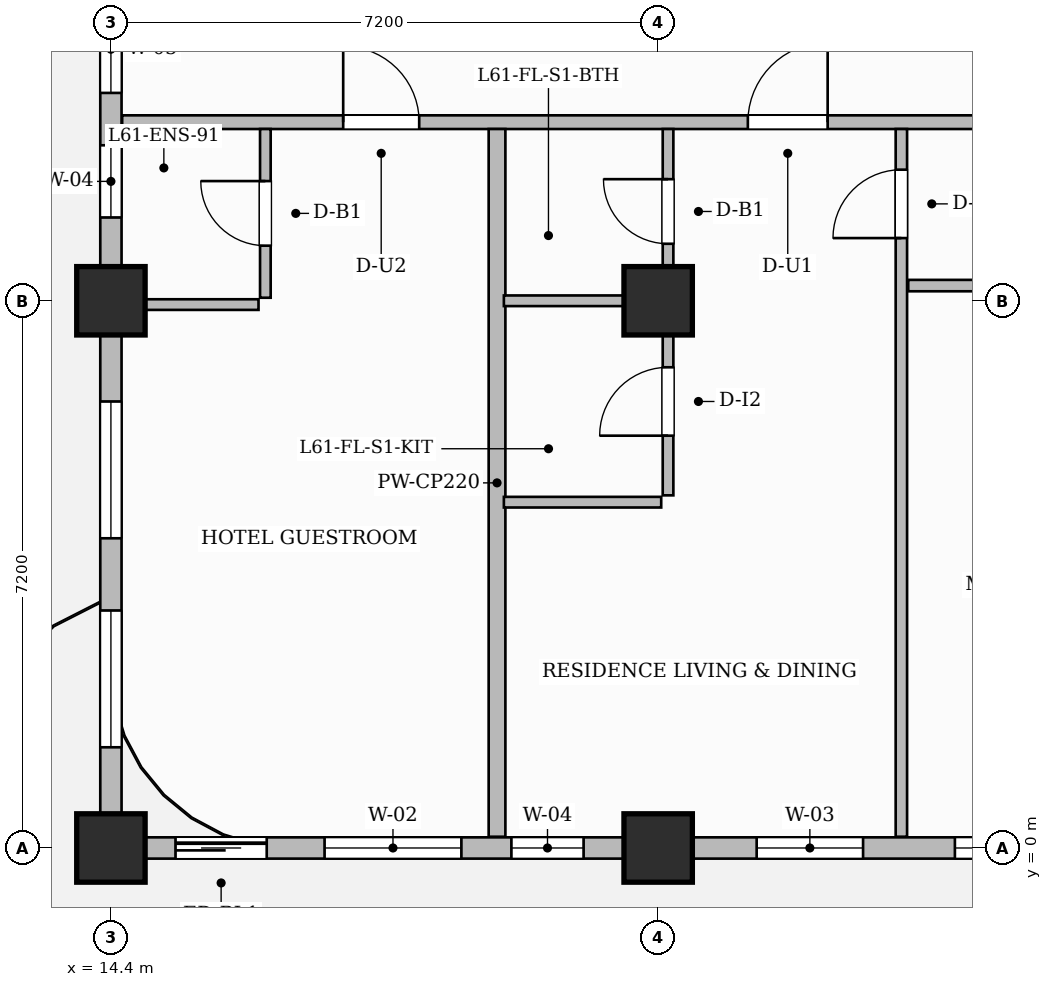
"""IFC4 building model, lengths in metres.
Left out: names, types, materials, properties, quantities, classifications, styles, units other than length and angle.
Written with IfcOpenShell. Run it as: python <this file> out.ifc"""

import sys

from ifc_helpers import new_model, si_unit, direction, frame, frame_2d, origin, origin_2d, place, context, subcontext, project, spatial, rectangle, extrude, source, transform, mapped, element, fill, save


model = new_model("IFC4")
c1 = context("Model", 3, precision=1e-05, world=origin(), true_north=direction((0.0, 1.0)))
c2 = subcontext(c1, "Body", "Model", "MODEL_VIEW")
j1 = project(units=[si_unit("LENGTHUNIT", "METRE"), si_unit("PLANEANGLEUNIT", "RADIAN")], contexts=[c1])
p1 = place(None, origin())
s1 = spatial("IfcSite", under=j1, at=p1, CompositionType="ELEMENT")
p2 = place(p1, origin())
s2 = spatial("IfcBuilding", under=s1, at=p2, CompositionType="ELEMENT")
p3 = place(p2, frame((0.0, 0.0, 244.25)))
s3 = spatial("IfcBuildingStorey", under=s2, at=p3, CompositionType="ELEMENT", Elevation=244.25)
m1 = source(origin(), c2, "Body", "SweptSolid", [
    extrude(rectangle(XDim=0.9, YDim=0.9, at=origin_2d()), origin(), (0.0, 0.0, 1.0), 3.85),
])
for number, where, z_axis, x_axis in (
    (1, (14.4, 0.0, 0.0), (0.0, 0.0, 1.0), (1.0, 0.0, 0.0)),
    (2, (14.4, 7.2, 0.0), (0.0, 0.0, 1.0), (1.0, 0.0, 0.0)),
    (3, (21.6, 0.0, 0.0), (0.0, 0.0, 1.0), (1.0, 0.0, 0.0)),
    (4, (21.6, 7.2, 0.0), (0.0, 0.0, 1.0), (1.0, 0.0, 0.0)),
):
    element("IfcColumn", number, at=place(p3, frame(where, z_axis=z_axis, x_axis=x_axis)), inside=s3, PredefinedType="COLUMN", context=c2, shape_type="MappedRepresentation", body=[
        mapped(m1, transform((0.0, 0.0, 0.0), scale=1.0)),
    ])
p4 = place(p3, frame((14.548, 9.55, 0.0), z_axis=(0.0, 0.0, 1.0), x_axis=(1.0, 0.0, 0.0)))
e5 = element("IfcWall", 5, at=p4, inside=s3, PredefinedType="PARTITIONING", context=c2, shape_type="SweptSolid", body=[
    extrude(rectangle(XDim=15.562, YDim=0.18, at=frame_2d((7.781, 0.0))), origin(), (0.0, 0.0, 1.0), 3.6),
])
p5 = place(p4, frame((2.908, 0.0, 0.0)))
e6 = element("IfcOpeningElement", 6, at=p5, cuts=e5, PredefinedType="OPENING", context=c2, shape_type="SweptSolid", body=[
    extrude(rectangle(XDim=1.0, YDim=2.2, at=frame_2d((0.5, 1.1))), frame((0.0, 0.1, 0.0), z_axis=(0.0, -1.0, 0.0), x_axis=(1.0, 0.0, 0.0)), (0.0, 0.0, 1.0), 0.2),
])
p6 = place(p4, frame((8.232, 0.0, 0.0)))
e7 = element("IfcOpeningElement", 7, at=p6, cuts=e5, PredefinedType="OPENING", context=c2, shape_type="SweptSolid", body=[
    extrude(rectangle(XDim=1.05, YDim=2.25, at=frame_2d((0.525, 1.125))), frame((0.0, 0.1, 0.0), z_axis=(0.0, -1.0, 0.0), x_axis=(1.0, 0.0, 0.0)), (0.0, 0.0, 1.0), 0.2),
])
p7 = place(p3, frame((19.48, 0.148, 0.0), z_axis=(0.0, 0.0, 1.0), x_axis=(0.0, 1.0, 0.0)))
e8 = element("IfcWall", 8, at=p7, inside=s3, PredefinedType="PARTITIONING", context=c2, shape_type="SweptSolid", body=[
    extrude(rectangle(XDim=9.312, YDim=0.22, at=frame_2d((4.656, 0.0))), origin(), (0.0, 0.0, 1.0), 3.6),
])
p8 = place(p3, frame((16.432, 7.24, 0.0), z_axis=(0.0, 0.0, 1.0), x_axis=(0.0, 1.0, 0.0)))
e9 = element("IfcWall", 9, at=p8, inside=s3, PredefinedType="PARTITIONING", context=c2, shape_type="SweptSolid", body=[
    extrude(rectangle(XDim=2.22, YDim=0.14, at=frame_2d((1.11, 0.0))), origin(), (0.0, 0.0, 1.0), 3.6),
])
p9 = place(p8, frame((0.685, 0.0, 0.0)))
e10 = element("IfcOpeningElement", 10, at=p9, cuts=e9, PredefinedType="OPENING", context=c2, shape_type="SweptSolid", body=[
    extrude(rectangle(XDim=0.85, YDim=2.1, at=frame_2d((0.425, 1.05))), frame((0.0, 0.08, 0.0), z_axis=(0.0, -1.0, 0.0), x_axis=(1.0, 0.0, 0.0)), (0.0, 0.0, 1.0), 0.16),
])
p10 = place(p3, frame((14.49, 7.15, 0.0), z_axis=(0.0, 0.0, 1.0), x_axis=(1.0, 0.0, 0.0)))
e11 = element("IfcWall", 11, at=p10, inside=s3, PredefinedType="PARTITIONING", context=c2, shape_type="SweptSolid", body=[
    extrude(rectangle(XDim=1.852, YDim=0.14, at=frame_2d((0.926, 0.0))), origin(), (0.0, 0.0, 1.0), 3.135),
])
p11 = place(p3, frame((21.73, 4.64, 0.0), z_axis=(0.0, 0.0, 1.0), x_axis=(0.0, 1.0, 0.0)))
e12 = element("IfcWall", 12, at=p11, inside=s3, PredefinedType="PARTITIONING", context=c2, shape_type="SweptSolid", body=[
    extrude(rectangle(XDim=4.82, YDim=0.14, at=frame_2d((2.41, 0.0))), origin(), (0.0, 0.0, 1.0), 3.135),
])
p12 = place(p11, frame((0.785, 0.0, 0.0)))
e13 = element("IfcOpeningElement", 13, at=p12, cuts=e12, PredefinedType="OPENING", context=c2, shape_type="SweptSolid", body=[
    extrude(rectangle(XDim=0.9, YDim=2.15, at=frame_2d((0.45, 1.075))), frame((0.0, 0.08, 0.0), z_axis=(0.0, -1.0, 0.0), x_axis=(1.0, 0.0, 0.0)), (0.0, 0.0, 1.0), 0.16),
])
p13 = place(p11, frame((3.31, 0.0, 0.0)))
e14 = element("IfcOpeningElement", 14, at=p13, cuts=e12, PredefinedType="OPENING", context=c2, shape_type="SweptSolid", body=[
    extrude(rectangle(XDim=0.85, YDim=2.1, at=frame_2d((0.425, 1.05))), frame((0.0, 0.08, 0.0), z_axis=(0.0, -1.0, 0.0), x_axis=(1.0, 0.0, 0.0)), (0.0, 0.0, 1.0), 0.16),
])
p14 = place(p3, frame((19.57, 7.2, 0.0), z_axis=(0.0, 0.0, 1.0), x_axis=(1.0, 0.0, 0.0)))
e15 = element("IfcWall", 15, at=p14, inside=s3, PredefinedType="PARTITIONING", context=c2, shape_type="SweptSolid", body=[
    extrude(rectangle(XDim=2.07, YDim=0.14, at=frame_2d((1.035, 0.0))), origin(), (0.0, 0.0, 1.0), 3.135),
])
p15 = place(p3, frame((19.57, 4.55, 0.0), z_axis=(0.0, 0.0, 1.0), x_axis=(1.0, 0.0, 0.0)))
e16 = element("IfcWall", 16, at=p15, inside=s3, PredefinedType="PARTITIONING", context=c2, shape_type="SweptSolid", body=[
    extrude(rectangle(XDim=2.07, YDim=0.14, at=frame_2d((1.035, 0.0))), origin(), (0.0, 0.0, 1.0), 3.6),
])
p16 = place(p3, frame((24.8, 0.148, 0.0), z_axis=(0.0, 0.0, 1.0), x_axis=(0.0, 1.0, 0.0)))
e17 = element("IfcWall", 17, at=p16, inside=s3, PredefinedType="PARTITIONING", context=c2, shape_type="SweptSolid", body=[
    extrude(rectangle(XDim=9.312, YDim=0.15, at=frame_2d((4.656, 0.0))), origin(), (0.0, 0.0, 1.0), 3.6),
])
p17 = place(p16, frame((7.877, 0.0, 0.0)))
e18 = element("IfcOpeningElement", 18, at=p17, cuts=e17, PredefinedType="OPENING", context=c2, shape_type="SweptSolid", body=[
    extrude(rectangle(XDim=0.9, YDim=2.15, at=frame_2d((0.45, 1.075))), frame((0.0, 0.085, 0.0), z_axis=(0.0, -1.0, 0.0), x_axis=(1.0, 0.0, 0.0)), (0.0, 0.0, 1.0), 0.17),
])
p18 = place(p3, frame((24.89, 7.4, 0.0), z_axis=(0.0, 0.0, 1.0), x_axis=(1.0, 0.0, 0.0)))
e19 = element("IfcWall", 19, at=p18, inside=s3, PredefinedType="PARTITIONING", context=c2, shape_type="SweptSolid", body=[
    extrude(rectangle(XDim=5.22, YDim=0.15, at=frame_2d((2.61, 0.0))), origin(), (0.0, 0.0, 1.0), 3.135),
])
p19 = place(p18, frame((1.11, 0.0, 0.0)))
e20 = element("IfcOpeningElement", 20, at=p19, cuts=e19, PredefinedType="OPENING", context=c2, shape_type="SweptSolid", body=[
    extrude(rectangle(XDim=0.9, YDim=2.15, at=frame_2d((0.45, 1.075))), frame((0.0, 0.085, 0.0), z_axis=(0.0, -1.0, 0.0), x_axis=(1.0, 0.0, 0.0)), (0.0, 0.0, 1.0), 0.17),
])
p20 = place(p3, frame((14.4, 0.0, 0.0), z_axis=(0.0, 0.0, 1.0), x_axis=(1.0, 0.0, 0.0)))
e21 = element("IfcWall", 21, at=p20, inside=s3, PredefinedType="SOLIDWALL", context=c2, shape_type="SweptSolid", body=[
    extrude(rectangle(XDim=35.4, YDim=0.28, at=frame_2d((17.7, 0.0))), origin(), (0.0, 0.0, 1.0), 3.135),
])
p21 = place(p20, frame((0.85, 0.0, 0.0)))
e22 = element("IfcOpeningElement", 22, at=p21, cuts=e21, PredefinedType="OPENING", context=c2, shape_type="SweptSolid", body=[
    extrude(rectangle(XDim=1.2, YDim=2.2, at=frame_2d((0.6, 1.1))), frame((0.0, 0.15, 0.0), z_axis=(0.0, -1.0, 0.0), x_axis=(1.0, 0.0, 0.0)), (0.0, 0.0, 1.0), 0.3),
])
p22 = place(p20, frame((2.811, 0.0, 0.8)))
e23 = element("IfcOpeningElement", 23, at=p22, cuts=e21, PredefinedType="OPENING", context=c2, shape_type="SweptSolid", body=[
    extrude(rectangle(XDim=1.8, YDim=1.85, at=frame_2d((0.9, 0.925))), frame((0.0, 0.15, 0.0), z_axis=(0.0, -1.0, 0.0), x_axis=(1.0, 0.0, 0.0)), (0.0, 0.0, 1.0), 0.3),
])
p23 = place(p20, frame((5.269, 0.0, 0.8)))
e24 = element("IfcOpeningElement", 24, at=p23, cuts=e21, PredefinedType="OPENING", context=c2, shape_type="SweptSolid", body=[
    extrude(rectangle(XDim=0.95, YDim=1.75, at=frame_2d((0.475, 0.875))), frame((0.0, 0.15, 0.0), z_axis=(0.0, -1.0, 0.0), x_axis=(1.0, 0.0, 0.0)), (0.0, 0.0, 1.0), 0.3),
])
p24 = place(p20, frame((8.496, 0.0, 0.8)))
e25 = element("IfcOpeningElement", 25, at=p24, cuts=e21, PredefinedType="OPENING", context=c2, shape_type="SweptSolid", body=[
    extrude(rectangle(XDim=1.4, YDim=1.85, at=frame_2d((0.7, 0.925))), frame((0.0, 0.15, 0.0), z_axis=(0.0, -1.0, 0.0), x_axis=(1.0, 0.0, 0.0)), (0.0, 0.0, 1.0), 0.3),
])
p25 = place(p20, frame((11.104, 0.0, 0.8)))
e26 = element("IfcOpeningElement", 26, at=p25, cuts=e21, PredefinedType="OPENING", context=c2, shape_type="SweptSolid", body=[
    extrude(rectangle(XDim=1.8, YDim=1.85, at=frame_2d((0.9, 0.925))), frame((0.0, 0.15, 0.0), z_axis=(0.0, -1.0, 0.0), x_axis=(1.0, 0.0, 0.0)), (0.0, 0.0, 1.0), 0.3),
])
p26 = place(p20, frame((16.804, 0.0, 0.8)))
e27 = element("IfcOpeningElement", 27, at=p26, cuts=e21, PredefinedType="OPENING", context=c2, shape_type="SweptSolid", body=[
    extrude(rectangle(XDim=1.8, YDim=1.85, at=frame_2d((0.9, 0.925))), frame((0.0, 0.15, 0.0), z_axis=(0.0, -1.0, 0.0), x_axis=(1.0, 0.0, 0.0)), (0.0, 0.0, 1.0), 0.3),
])
p27 = place(p20, frame((21.725, 0.0, 0.8)))
e28 = element("IfcOpeningElement", 28, at=p27, cuts=e21, PredefinedType="OPENING", context=c2, shape_type="SweptSolid", body=[
    extrude(rectangle(XDim=1.8, YDim=1.85, at=frame_2d((0.9, 0.925))), frame((0.0, 0.15, 0.0), z_axis=(0.0, -1.0, 0.0), x_axis=(1.0, 0.0, 0.0)), (0.0, 0.0, 1.0), 0.3),
])
p28 = place(p20, frame((24.475, 0.0, 0.8)))
e29 = element("IfcOpeningElement", 29, at=p28, cuts=e21, PredefinedType="OPENING", context=c2, shape_type="SweptSolid", body=[
    extrude(rectangle(XDim=1.8, YDim=1.85, at=frame_2d((0.9, 0.925))), frame((0.0, 0.15, 0.0), z_axis=(0.0, -1.0, 0.0), x_axis=(1.0, 0.0, 0.0)), (0.0, 0.0, 1.0), 0.3),
])
p29 = place(p20, frame((29.075, 0.0, 0.8)))
e30 = element("IfcOpeningElement", 30, at=p29, cuts=e21, PredefinedType="OPENING", context=c2, shape_type="SweptSolid", body=[
    extrude(rectangle(XDim=1.8, YDim=1.85, at=frame_2d((0.9, 0.925))), frame((0.0, 0.15, 0.0), z_axis=(0.0, -1.0, 0.0), x_axis=(1.0, 0.0, 0.0)), (0.0, 0.0, 1.0), 0.3),
])
p30 = place(p20, frame((32.125, 0.0, 0.8)))
e31 = element("IfcOpeningElement", 31, at=p30, cuts=e21, PredefinedType="OPENING", context=c2, shape_type="SweptSolid", body=[
    extrude(rectangle(XDim=1.8, YDim=1.85, at=frame_2d((0.9, 0.925))), frame((0.0, 0.15, 0.0), z_axis=(0.0, -1.0, 0.0), x_axis=(1.0, 0.0, 0.0)), (0.0, 0.0, 1.0), 0.3),
])
p31 = place(p3, frame((14.4, 0.05, 0.0), z_axis=(0.0, 0.0, 1.0), x_axis=(0.0, 1.0, 0.0)))
e32 = element("IfcWall", 32, at=p31, inside=s3, PredefinedType="SOLIDWALL", context=c2, shape_type="SweptSolid", body=[
    extrude(rectangle(XDim=21.5, YDim=0.28, at=frame_2d((10.75, 0.0))), origin(), (0.0, 0.0, 1.0), 3.135),
])
p32 = place(p31, frame((1.275, 0.0, 0.8)))
e33 = element("IfcOpeningElement", 33, at=p32, cuts=e32, PredefinedType="OPENING", context=c2, shape_type="SweptSolid", body=[
    extrude(rectangle(XDim=1.8, YDim=1.85, at=frame_2d((0.9, 0.925))), frame((0.0, 0.15, 0.0), z_axis=(0.0, -1.0, 0.0), x_axis=(1.0, 0.0, 0.0)), (0.0, 0.0, 1.0), 0.3),
])
p33 = place(p31, frame((4.025, 0.0, 0.8)))
e34 = element("IfcOpeningElement", 34, at=p33, cuts=e32, PredefinedType="OPENING", context=c2, shape_type="SweptSolid", body=[
    extrude(rectangle(XDim=1.8, YDim=1.85, at=frame_2d((0.9, 0.925))), frame((0.0, 0.15, 0.0), z_axis=(0.0, -1.0, 0.0), x_axis=(1.0, 0.0, 0.0)), (0.0, 0.0, 1.0), 0.3),
])
p34 = place(p31, frame((8.246, 0.0, 0.8)))
e35 = element("IfcOpeningElement", 35, at=p34, cuts=e32, PredefinedType="OPENING", context=c2, shape_type="SweptSolid", body=[
    extrude(rectangle(XDim=0.95, YDim=1.75, at=frame_2d((0.475, 0.875))), frame((0.0, 0.15, 0.0), z_axis=(0.0, -1.0, 0.0), x_axis=(1.0, 0.0, 0.0)), (0.0, 0.0, 1.0), 0.3),
])
p35 = place(p31, frame((9.885, 0.0, 0.8)))
e36 = element("IfcOpeningElement", 36, at=p35, cuts=e32, PredefinedType="OPENING", context=c2, shape_type="SweptSolid", body=[
    extrude(rectangle(XDim=1.15, YDim=1.8, at=frame_2d((0.575, 0.9))), frame((0.0, 0.15, 0.0), z_axis=(0.0, -1.0, 0.0), x_axis=(1.0, 0.0, 0.0)), (0.0, 0.0, 1.0), 0.3),
])
p36 = place(p31, frame((11.789, 0.0, 0.8)))
e37 = element("IfcOpeningElement", 37, at=p36, cuts=e32, PredefinedType="OPENING", context=c2, shape_type="SweptSolid", body=[
    extrude(rectangle(XDim=1.4, YDim=1.85, at=frame_2d((0.7, 0.925))), frame((0.0, 0.15, 0.0), z_axis=(0.0, -1.0, 0.0), x_axis=(1.0, 0.0, 0.0)), (0.0, 0.0, 1.0), 0.3),
])
p37 = place(p31, frame((15.675, 0.0, 0.8)))
e38 = element("IfcOpeningElement", 38, at=p37, cuts=e32, PredefinedType="OPENING", context=c2, shape_type="SweptSolid", body=[
    extrude(rectangle(XDim=1.8, YDim=1.85, at=frame_2d((0.9, 0.925))), frame((0.0, 0.15, 0.0), z_axis=(0.0, -1.0, 0.0), x_axis=(1.0, 0.0, 0.0)), (0.0, 0.0, 1.0), 0.3),
])
p38 = place(p31, frame((18.425, 0.0, 0.8)))
e39 = element("IfcOpeningElement", 39, at=p38, cuts=e32, PredefinedType="OPENING", context=c2, shape_type="SweptSolid", body=[
    extrude(rectangle(XDim=1.8, YDim=1.85, at=frame_2d((0.9, 0.925))), frame((0.0, 0.15, 0.0), z_axis=(0.0, -1.0, 0.0), x_axis=(1.0, 0.0, 0.0)), (0.0, 0.0, 1.0), 0.3),
])
m2 = source(origin(), c2, "Body", "SweptSolid", [
    extrude(rectangle(XDim=0.85, YDim=2.1, at=frame_2d((0.425, 1.05))), frame((0.0, 0.025, 0.0), z_axis=(0.0, -1.0, 0.0), x_axis=(1.0, 0.0, 0.0)), (0.0, 0.0, 1.0), 0.05),
])
p39 = place(p9, origin())
e40 = element("IfcDoor", 40, at=p39, inside=s3, OperationType="SINGLE_SWING_RIGHT", PredefinedType="DOOR", context=c2, shape_type="MappedRepresentation", body=[
    mapped(m2, transform((0.0, 0.0, 0.0), scale=1.0)),
])
fill(e10, e40)
m3 = source(origin(), c2, "Body", "SweptSolid", [
    extrude(rectangle(XDim=1.0, YDim=2.2, at=frame_2d((0.5, 1.1))), frame((0.0, 0.025, 0.0), z_axis=(0.0, -1.0, 0.0), x_axis=(1.0, 0.0, 0.0)), (0.0, 0.0, 1.0), 0.05),
])
p40 = place(p5, origin())
e41 = element("IfcDoor", 41, at=p40, inside=s3, OperationType="SINGLE_SWING_LEFT", PredefinedType="DOOR", context=c2, shape_type="MappedRepresentation", body=[
    mapped(m3, transform((0.0, 0.0, 0.0), scale=1.0)),
])
fill(e6, e41)
m4 = source(origin(), c2, "Body", "SweptSolid", [
    extrude(rectangle(XDim=0.9, YDim=2.15, at=frame_2d((0.45, 1.075))), frame((0.0, 0.025, 0.0), z_axis=(0.0, -1.0, 0.0), x_axis=(1.0, 0.0, 0.0)), (0.0, 0.0, 1.0), 0.05),
])
p41 = place(p12, origin())
e42 = element("IfcDoor", 42, at=p41, inside=s3, OperationType="SINGLE_SWING_LEFT", PredefinedType="DOOR", context=c2, shape_type="MappedRepresentation", body=[
    mapped(m4, transform((0.0, 0.0, 0.0), scale=1.0)),
])
fill(e13, e42)
p42 = place(p13, origin())
e43 = element("IfcDoor", 43, at=p42, inside=s3, OperationType="SINGLE_SWING_RIGHT", PredefinedType="DOOR", context=c2, shape_type="MappedRepresentation", body=[
    mapped(m2, transform((0.0, 0.0, 0.0), scale=1.0)),
])
fill(e14, e43)
m5 = source(origin(), c2, "Body", "SweptSolid", [
    extrude(rectangle(XDim=1.05, YDim=2.25, at=frame_2d((0.525, 1.125))), frame((0.0, 0.025, 0.0), z_axis=(0.0, -1.0, 0.0), x_axis=(1.0, 0.0, 0.0)), (0.0, 0.0, 1.0), 0.05),
])
p43 = place(p6, origin())
e44 = element("IfcDoor", 44, at=p43, inside=s3, OperationType="SINGLE_SWING_RIGHT", PredefinedType="DOOR", context=c2, shape_type="MappedRepresentation", body=[
    mapped(m5, transform((0.0, 0.0, 0.0), scale=1.0)),
])
fill(e7, e44)
p44 = place(p17, origin())
e45 = element("IfcDoor", 45, at=p44, inside=s3, OperationType="SINGLE_SWING_LEFT", PredefinedType="DOOR", context=c2, shape_type="MappedRepresentation", body=[
    mapped(m4, transform((0.0, 0.0, 0.0), scale=1.0)),
])
fill(e18, e45)
m6 = source(origin(), c2, "Body", "SweptSolid", [
    extrude(rectangle(XDim=1.2, YDim=2.2, at=frame_2d((0.6, 1.1))), frame((0.0, 0.025, 0.0), z_axis=(0.0, -1.0, 0.0), x_axis=(1.0, 0.0, 0.0)), (0.0, 0.0, 1.0), 0.05),
])
p45 = place(p21, origin())
e46 = element("IfcDoor", 46, at=p45, inside=s3, OperationType="SLIDING_TO_LEFT", PredefinedType="DOOR", context=c2, shape_type="MappedRepresentation", body=[
    mapped(m6, transform((0.0, 0.0, 0.0), scale=1.0)),
])
fill(e22, e46)
m7 = source(origin(), c2, "Body", "SweptSolid", [
    extrude(rectangle(XDim=1.8, YDim=1.85, at=frame_2d((0.9, 0.925))), frame((0.0, 0.03, 0.0), z_axis=(0.0, -1.0, 0.0), x_axis=(1.0, 0.0, 0.0)), (0.0, 0.0, 1.0), 0.06),
])
p46 = place(p22, origin())
e47 = element("IfcWindow", 47, at=p46, inside=s3, PartitioningType="DOUBLE_PANEL_VERTICAL", PredefinedType="WINDOW", context=c2, shape_type="MappedRepresentation", body=[
    mapped(m7, transform((0.0, 0.0, 0.0), scale=1.0)),
])
fill(e23, e47)
m8 = source(origin(), c2, "Body", "SweptSolid", [
    extrude(rectangle(XDim=0.95, YDim=1.75, at=frame_2d((0.475, 0.875))), frame((0.0, 0.03, 0.0), z_axis=(0.0, -1.0, 0.0), x_axis=(1.0, 0.0, 0.0)), (0.0, 0.0, 1.0), 0.06),
])
p47 = place(p23, origin())
e48 = element("IfcWindow", 48, at=p47, inside=s3, PartitioningType="SINGLE_PANEL", PredefinedType="WINDOW", context=c2, shape_type="MappedRepresentation", body=[
    mapped(m8, transform((0.0, 0.0, 0.0), scale=1.0)),
])
fill(e24, e48)
m9 = source(origin(), c2, "Body", "SweptSolid", [
    extrude(rectangle(XDim=1.4, YDim=1.85, at=frame_2d((0.7, 0.925))), frame((0.0, 0.03, 0.0), z_axis=(0.0, -1.0, 0.0), x_axis=(1.0, 0.0, 0.0)), (0.0, 0.0, 1.0), 0.06),
])
p48 = place(p24, origin())
e49 = element("IfcWindow", 49, at=p48, inside=s3, PartitioningType="SINGLE_PANEL", PredefinedType="WINDOW", context=c2, shape_type="MappedRepresentation", body=[
    mapped(m9, transform((0.0, 0.0, 0.0), scale=1.0)),
])
fill(e25, e49)
p49 = place(p25, origin())
e50 = element("IfcWindow", 50, at=p49, inside=s3, PartitioningType="DOUBLE_PANEL_VERTICAL", PredefinedType="WINDOW", context=c2, shape_type="MappedRepresentation", body=[
    mapped(m7, transform((0.0, 0.0, 0.0), scale=1.0)),
])
fill(e26, e50)
p50 = place(p32, origin())
e51 = element("IfcWindow", 51, at=p50, inside=s3, PartitioningType="DOUBLE_PANEL_VERTICAL", PredefinedType="WINDOW", context=c2, shape_type="MappedRepresentation", body=[
    mapped(m7, transform((0.0, 0.0, 0.0), scale=1.0)),
])
fill(e33, e51)
p51 = place(p33, origin())
e52 = element("IfcWindow", 52, at=p51, inside=s3, PartitioningType="DOUBLE_PANEL_VERTICAL", PredefinedType="WINDOW", context=c2, shape_type="MappedRepresentation", body=[
    mapped(m7, transform((0.0, 0.0, 0.0), scale=1.0)),
])
fill(e34, e52)
p52 = place(p34, origin())
e53 = element("IfcWindow", 53, at=p52, inside=s3, PartitioningType="SINGLE_PANEL", PredefinedType="WINDOW", context=c2, shape_type="MappedRepresentation", body=[
    mapped(m8, transform((0.0, 0.0, 0.0), scale=1.0)),
])
fill(e35, e53)
m10 = source(origin(), c2, "Body", "SweptSolid", [
    extrude(rectangle(XDim=1.15, YDim=1.8, at=frame_2d((0.575, 0.9))), frame((0.0, 0.03, 0.0), z_axis=(0.0, -1.0, 0.0), x_axis=(1.0, 0.0, 0.0)), (0.0, 0.0, 1.0), 0.06),
])
p53 = place(p35, origin())
e54 = element("IfcWindow", 54, at=p53, inside=s3, PartitioningType="SINGLE_PANEL", PredefinedType="WINDOW", context=c2, shape_type="MappedRepresentation", body=[
    mapped(m10, transform((0.0, 0.0, 0.0), scale=1.0)),
])
fill(e36, e54)
save(model, sys.argv[1])
